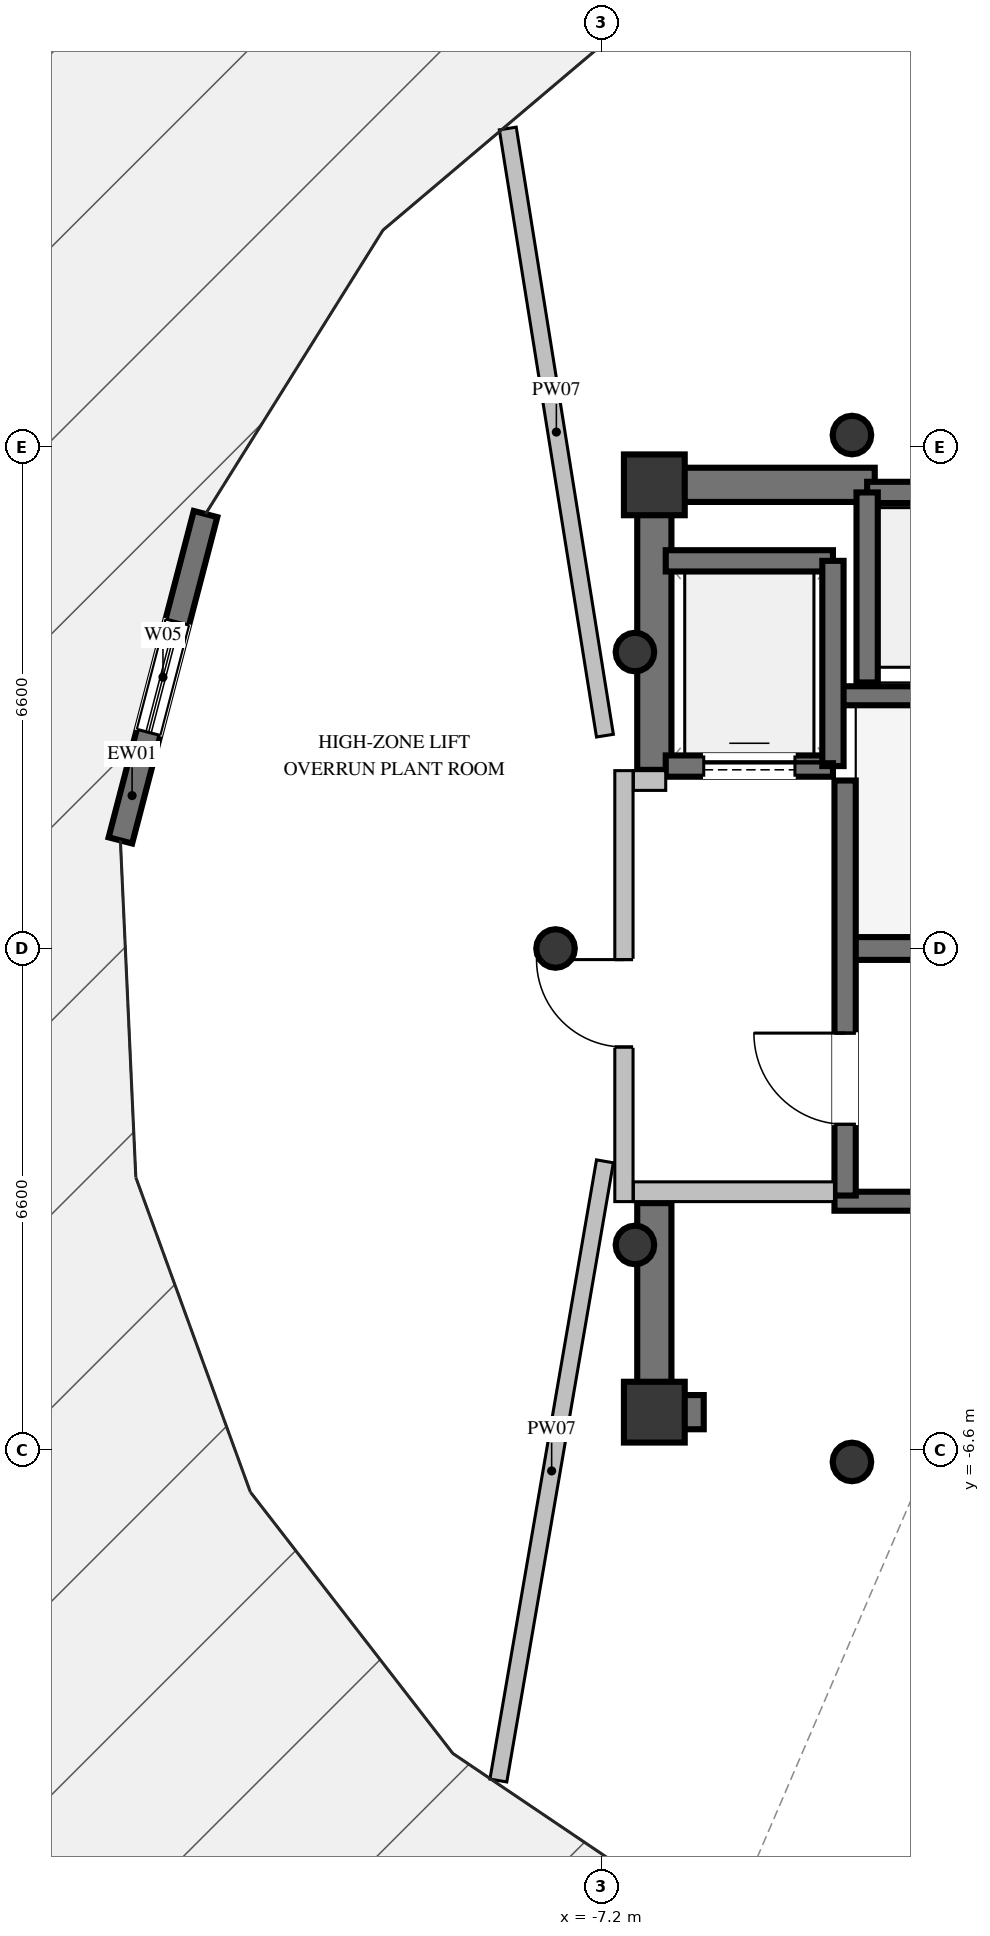
"""IFC4 building model, lengths in metres.
Left out: names, types, materials, properties, quantities, classifications, styles, units other than length and angle.
Written with IfcOpenShell. Run it as: python <this file> out.ifc"""

import sys

from ifc_helpers import new_model, si_unit, direction, frame, frame_2d, origin, origin_2d, place, context, subcontext, project, spatial, rectangle, hollow_circle, extrude, element, fill, save


model = new_model("IFC4")
c1 = context("Model", 3, precision=1e-05, world=origin(), true_north=direction((0.0, 1.0)))
c2 = subcontext(c1, "Body", "Model", "MODEL_VIEW")
j1 = project(units=[si_unit("LENGTHUNIT", "METRE"), si_unit("PLANEANGLEUNIT", "RADIAN")], contexts=[c1])
p1 = place(None, origin())
s1 = spatial("IfcSite", under=j1, at=p1, CompositionType="ELEMENT")
p2 = place(p1, origin())
s2 = spatial("IfcBuilding", under=s1, at=p2, CompositionType="ELEMENT")
p3 = place(p2, frame((0.0, 0.0, 302.2)))
s3 = spatial("IfcBuildingStorey", under=s2, at=p3, CompositionType="ELEMENT", Elevation=302.2)
for number, where, z_axis, x_axis in (
    (1, (-6.5, -6.1, 0.0), (0.0, 0.0, 1.0), (1.0, 0.0, 0.0)),
    (2, (-6.5, 6.1, 0.0), (0.0, 0.0, 1.0), (1.0, 0.0, 0.0)),
):
    element("IfcColumn", number, at=place(p3, frame(where, z_axis=z_axis, x_axis=x_axis)), inside=s3, PredefinedType="COLUMN", context=c2, shape_type="SweptSolid", body=[
        extrude(rectangle(XDim=0.8, YDim=0.8, at=origin_2d()), origin(), (0.0, 0.0, 1.0), 6.0),
    ])
p4 = place(p3, frame((-3.99, 0.0, 0.0), z_axis=(0.0, 0.0, 1.0), x_axis=(1.0, 0.0, 0.0)))
e3 = element("IfcWall", 3, at=p4, inside=s3, PredefinedType="SHEAR", context=c2, shape_type="SweptSolid", body=[
    extrude(rectangle(XDim=7.98, YDim=0.3, at=frame_2d((3.99, 0.0))), origin(), (0.0, 0.0, 1.0), 6.0),
])
for number, where, z_axis, x_axis in (
    (4, (-4.13, -3.325, 0.0), (0.0, 0.0, 1.0), (1.0, 0.0, 0.0)),
    (5, (-4.13, 3.325, 0.0), (0.0, 0.0, 1.0), (1.0, 0.0, 0.0)),
):
    element("IfcWall", number, at=place(p3, frame(where, z_axis=z_axis, x_axis=x_axis)), inside=s3, PredefinedType="SOLIDWALL", context=c2, shape_type="SweptSolid", body=[
        extrude(rectangle(XDim=8.26, YDim=0.25, at=frame_2d((4.13, 0.0))), origin(), (0.0, 0.0, 1.0), 6.0),
    ])
p5 = place(p3, frame((-6.275, -6.1, 0.0), z_axis=(0.0, 0.0, 1.0), x_axis=(1.0, 0.0, 0.0)))
e6 = element("IfcWall", 6, at=p5, inside=s3, PredefinedType="SHEAR", context=c2, shape_type="SweptSolid", body=[
    extrude(rectangle(XDim=0.425, YDim=0.45, at=frame_2d((0.212, 0.0))), origin(), (0.0, 0.0, 1.0), 6.0),
])
p6 = place(p3, frame((-6.275, 6.1, 0.0), z_axis=(0.0, 0.0, 1.0), x_axis=(1.0, 0.0, 0.0)))
e7 = element("IfcWall", 7, at=p6, inside=s3, PredefinedType="SHEAR", context=c2, shape_type="SweptSolid", body=[
    extrude(rectangle(XDim=2.675, YDim=0.45, at=frame_2d((1.337, 0.0))), origin(), (0.0, 0.0, 1.0), 6.0),
])
p7 = place(p3, frame((-6.5, 2.35, 0.0), z_axis=(0.0, 0.0, 1.0), x_axis=(0.0, 1.0, 0.0)))
e8 = element("IfcWall", 8, at=p7, inside=s3, PredefinedType="SHEAR", context=c2, shape_type="SweptSolid", body=[
    extrude(rectangle(XDim=3.975, YDim=0.45, at=frame_2d((1.987, 0.0))), origin(), (0.0, 0.0, 1.0), 6.0),
])
p8 = place(p3, frame((-6.5, -6.325, 0.0), z_axis=(0.0, 0.0, 1.0), x_axis=(0.0, 1.0, 0.0)))
e9 = element("IfcWall", 9, at=p8, inside=s3, PredefinedType="SHEAR", context=c2, shape_type="SweptSolid", body=[
    extrude(rectangle(XDim=2.975, YDim=0.45, at=frame_2d((1.487, 0.0))), origin(), (0.0, 0.0, 1.0), 6.0),
])
for number, where, z_axis, x_axis in (
    (10, (-3.9, 6.755, 0.0), (0.0, 0.0, 1.0), (1.0, 0.0, 0.0)),
    (11, (-6.755, 3.9, 0.0), (0.0, 0.0, 1.0), (1.0, 0.0, 0.0)),
    (12, (-7.8, 0.0, 0.0), (0.0, 0.0, 1.0), (1.0, 0.0, 0.0)),
    (13, (-6.755, -3.9, 0.0), (0.0, 0.0, 1.0), (1.0, 0.0, 0.0)),
    (14, (-3.9, -6.755, 0.0), (0.0, 0.0, 1.0), (1.0, 0.0, 0.0)),
):
    element("IfcColumn", number, at=place(p3, frame(where, z_axis=z_axis, x_axis=x_axis)), inside=s3, PredefinedType="COLUMN", context=c2, shape_type="SweptSolid", body=[
        extrude(hollow_circle(Radius=0.254, WallThickness=0.02, at=origin_2d()), origin(), (0.0, 0.0, 1.0), 6.0),
    ])
p9 = place(p3, frame((-13.525, 1.422, 0.0), z_axis=(0.0, 0.0, 1.0), x_axis=(0.252361427014, 0.967633045196, 0.0)))
e15 = element("IfcWall", 15, at=p9, inside=s3, PredefinedType="SOLIDWALL", context=c2, shape_type="SweptSolid", body=[
    extrude(rectangle(XDim=4.438, YDim=0.32, at=frame_2d((2.219, 0.0))), origin(), (0.0, 0.0, 1.0), 5.72),
])
p10 = place(p9, frame((1.469, 0.0, 1.1)))
e16 = element("IfcOpeningElement", 16, at=p10, cuts=e15, PredefinedType="OPENING", context=c2, shape_type="SweptSolid", body=[
    extrude(rectangle(XDim=1.5, YDim=1.2, at=frame_2d((0.75, 0.6))), frame((0.0, 0.17, 0.0), z_axis=(0.0, -1.0, 0.0), x_axis=(1.0, 0.0, 0.0)), (0.0, 0.0, 1.0), 0.34),
])
p11 = place(p3, frame((-17.434, -9.813, 0.0), z_axis=(0.0, 0.0, 1.0), x_axis=(0.613915195136, -0.78937198657, 0.0)))
e17 = element("IfcWall", 17, at=p11, inside=s3, PredefinedType="PARAPET", context=c2, shape_type="SweptSolid", body=[
    extrude(rectangle(XDim=5.985, YDim=0.22, at=frame_2d((2.992, 0.0))), origin(), (0.0, 0.0, 1.0), 1.2),
])
p12 = place(p3, frame((-1.6, 6.0, 0.0), z_axis=(0.0, 0.0, 1.0), x_axis=(-1.0, 0.0, 0.0)))
e18 = element("IfcWall", 18, at=p12, inside=s3, PredefinedType="SOLIDWALL", context=c2, shape_type="SweptSolid", body=[
    extrude(rectangle(XDim=2.1, YDim=0.28, at=frame_2d((1.05, 0.0))), origin(), (0.0, 0.0, 1.0), 5.72),
])
p13 = place(p3, frame((-3.7, 6.0, 0.0), z_axis=(0.0, 0.0, 1.0), x_axis=(0.0, -1.0, 0.0)))
e19 = element("IfcWall", 19, at=p13, inside=s3, PredefinedType="SOLIDWALL", context=c2, shape_type="SweptSolid", body=[
    extrude(rectangle(XDim=2.5, YDim=0.28, at=frame_2d((1.25, 0.0))), origin(), (0.0, 0.0, 1.0), 5.72),
])
p14 = place(p3, frame((-6.35, 2.4, 0.0), z_axis=(0.0, 0.0, 1.0), x_axis=(1.0, 0.0, 0.0)))
e20 = element("IfcWall", 20, at=p14, inside=s3, PredefinedType="SOLIDWALL", context=c2, shape_type="SweptSolid", body=[
    extrude(rectangle(XDim=2.2, YDim=0.28, at=frame_2d((1.1, 0.0))), origin(), (0.0, 0.0, 1.0), 5.72),
])
p15 = place(p14, frame((0.5, 0.0, 0.0)))
e21 = element("IfcOpeningElement", 21, at=p15, cuts=e20, PredefinedType="OPENING", context=c2, shape_type="SweptSolid", body=[
    extrude(rectangle(XDim=1.2, YDim=2.2, at=frame_2d((0.6, 1.1))), frame((0.0, 0.15, 0.0), z_axis=(0.0, -1.0, 0.0), x_axis=(1.0, 0.0, 0.0)), (0.0, 0.0, 1.0), 0.3),
])
p16 = place(p3, frame((-4.15, 5.1, 0.0), z_axis=(0.0, 0.0, 1.0), x_axis=(-1.0, 0.0, 0.0)))
e22 = element("IfcWall", 22, at=p16, inside=s3, PredefinedType="SOLIDWALL", context=c2, shape_type="SweptSolid", body=[
    extrude(rectangle(XDim=2.2, YDim=0.28, at=frame_2d((1.1, 0.0))), origin(), (0.0, 0.0, 1.0), 5.72),
])
p17 = place(p3, frame((-4.15, 2.4, 0.0), z_axis=(0.0, 0.0, 1.0), x_axis=(0.0, 1.0, 0.0)))
e23 = element("IfcWall", 23, at=p17, inside=s3, PredefinedType="SOLIDWALL", context=c2, shape_type="SweptSolid", body=[
    extrude(rectangle(XDim=2.7, YDim=0.28, at=frame_2d((1.35, 0.0))), origin(), (0.0, 0.0, 1.0), 5.72),
])
p18 = place(p3, frame((-3.99, -3.25, 0.0), z_axis=(0.0, 0.0, 1.0), x_axis=(0.0, 1.0, 0.0)))
e24 = element("IfcWall", 24, at=p18, inside=s3, PredefinedType="SOLIDWALL", context=c2, shape_type="SweptSolid", body=[
    extrude(rectangle(XDim=5.46, YDim=0.28, at=frame_2d((2.73, 0.0))), origin(), (0.0, 0.0, 1.0), 5.72),
])
p19 = place(p18, frame((0.937, 0.0, 0.0)))
e25 = element("IfcOpeningElement", 25, at=p19, cuts=e24, PredefinedType="OPENING", context=c2, shape_type="SweptSolid", body=[
    extrude(rectangle(XDim=1.2, YDim=2.2, at=frame_2d((0.6, 1.1))), frame((0.0, 0.15, 0.0), z_axis=(0.0, -1.0, 0.0), x_axis=(1.0, 0.0, 0.0)), (0.0, 0.0, 1.0), 0.3),
])
p20 = place(p3, frame((-6.9, -3.33, 0.0), z_axis=(0.0, 0.0, 1.0), x_axis=(0.0, 1.0, 0.0)))
e26 = element("IfcWall", 26, at=p20, inside=s3, PredefinedType="PARTITIONING", context=c2, shape_type="SweptSolid", body=[
    extrude(rectangle(XDim=5.67, YDim=0.24, at=frame_2d((2.835, 0.0))), origin(), (0.0, 0.0, 1.0), 4.405),
])
p21 = place(p20, frame((2.034, 0.0, 0.0)))
e27 = element("IfcOpeningElement", 27, at=p21, cuts=e26, PredefinedType="OPENING", context=c2, shape_type="SweptSolid", body=[
    extrude(rectangle(XDim=1.15, YDim=2.2, at=frame_2d((0.575, 1.1))), frame((0.0, 0.13, 0.0), z_axis=(0.0, -1.0, 0.0), x_axis=(1.0, 0.0, 0.0)), (0.0, 0.0, 1.0), 0.26),
])
p22 = place(p3, frame((-6.775, -3.2, 0.0), z_axis=(0.0, 0.0, 1.0), x_axis=(1.0, 0.0, 0.0)))
e28 = element("IfcWall", 28, at=p22, inside=s3, PredefinedType="PARTITIONING", context=c2, shape_type="SweptSolid", body=[
    extrude(rectangle(XDim=2.645, YDim=0.26, at=frame_2d((1.323, 0.0))), origin(), (0.0, 0.0, 1.0), 5.72),
])
p23 = place(p3, frame((-6.775, 2.21, 0.0), z_axis=(0.0, 0.0, 1.0), x_axis=(1.0, 0.0, 0.0)))
e29 = element("IfcWall", 29, at=p23, inside=s3, PredefinedType="PARTITIONING", context=c2, shape_type="SweptSolid", body=[
    extrude(rectangle(XDim=0.425, YDim=0.26, at=frame_2d((0.212, 0.0))), origin(), (0.0, 0.0, 1.0), 5.72),
])
p24 = place(p3, frame((-7.15, 2.8, 0.0), z_axis=(0.0, 0.0, 1.0), x_axis=(-0.157989324062, 0.987440820243, 0.0)))
e30 = element("IfcWall", 30, at=p24, inside=s3, PredefinedType="PARTITIONING", context=c2, shape_type="SweptSolid", body=[
    extrude(rectangle(XDim=8.09, YDim=0.225, at=frame_2d((4.045, 0.0))), origin(), (0.0, 0.0, 1.0), 4.405),
])
p25 = place(p3, frame((-7.15, -2.8, 0.0), z_axis=(0.0, 0.0, 1.0), x_axis=(-0.169626996892, -0.985508336812, 0.0)))
e31 = element("IfcWall", 31, at=p25, inside=s3, PredefinedType="PARTITIONING", context=c2, shape_type="SweptSolid", body=[
    extrude(rectangle(XDim=8.266, YDim=0.225, at=frame_2d((4.133, 0.0))), origin(), (0.0, 0.0, 1.0), 4.405),
])
p26 = place(p10, origin())
e32 = element("IfcWindow", 32, at=p26, inside=s3, PartitioningType="SINGLE_PANEL", PredefinedType="WINDOW", context=c2, shape_type="SweptSolid", body=[
    extrude(rectangle(XDim=1.5, YDim=1.2, at=frame_2d((0.75, 0.6))), frame((0.0, 0.03, 0.0), z_axis=(0.0, -1.0, 0.0), x_axis=(1.0, 0.0, 0.0)), (0.0, 0.0, 1.0), 0.06),
])
fill(e16, e32)
p27 = place(p15, origin())
e33 = element("IfcDoor", 33, at=p27, inside=s3, OperationType="SLIDING_TO_LEFT", PredefinedType="DOOR", context=c2, shape_type="SweptSolid", body=[
    extrude(rectangle(XDim=1.2, YDim=2.2, at=frame_2d((0.6, 1.1))), frame((0.0, 0.025, 0.0), z_axis=(0.0, -1.0, 0.0), x_axis=(1.0, 0.0, 0.0)), (0.0, 0.0, 1.0), 0.05),
])
fill(e21, e33)
p28 = place(p19, origin())
e34 = element("IfcDoor", 34, at=p28, inside=s3, OperationType="SINGLE_SWING_RIGHT", PredefinedType="DOOR", context=c2, shape_type="SweptSolid", body=[
    extrude(rectangle(XDim=1.2, YDim=2.2, at=frame_2d((0.6, 1.1))), frame((0.0, 0.025, 0.0), z_axis=(0.0, -1.0, 0.0), x_axis=(1.0, 0.0, 0.0)), (0.0, 0.0, 1.0), 0.05),
])
fill(e25, e34)
p29 = place(p21, origin())
e35 = element("IfcDoor", 35, at=p29, inside=s3, OperationType="SINGLE_SWING_RIGHT", PredefinedType="DOOR", context=c2, shape_type="SweptSolid", body=[
    extrude(rectangle(XDim=1.15, YDim=2.2, at=frame_2d((0.575, 1.1))), frame((0.0, 0.025, 0.0), z_axis=(0.0, -1.0, 0.0), x_axis=(1.0, 0.0, 0.0)), (0.0, 0.0, 1.0), 0.05),
])
fill(e27, e35)
save(model, sys.argv[1])
